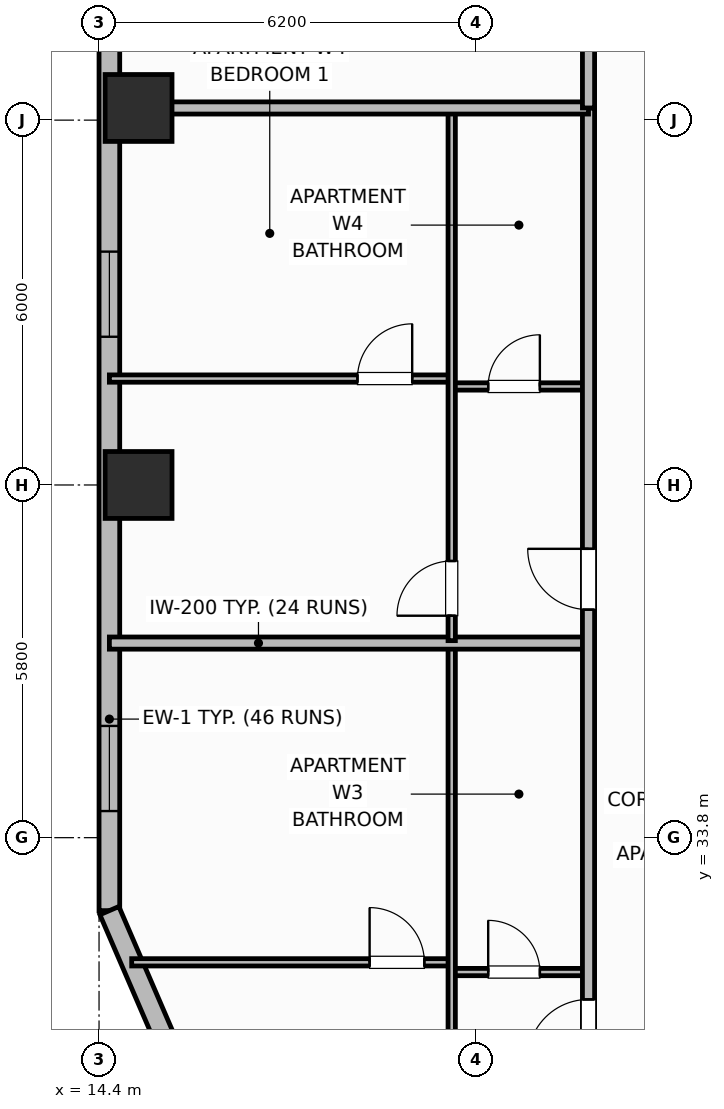
"""IFC4 building model, lengths in metres.
Left out: names, types, materials, properties, quantities, classifications, styles, units other than length and angle.
Written with IfcOpenShell. Run it as: python <this file> out.ifc"""

import sys

from ifc_helpers import new_model, si_unit, direction, frame, frame_2d, origin, origin_2d, place, context, subcontext, project, spatial, rectangle, extrude, element, fill, save


model = new_model("IFC4")
c1 = context("Model", 3, precision=1e-05, world=origin(), true_north=direction((0.0, 1.0)))
c2 = subcontext(c1, "Body", "Model", "MODEL_VIEW")
j1 = project(units=[si_unit("LENGTHUNIT", "METRE"), si_unit("PLANEANGLEUNIT", "RADIAN")], contexts=[c1])
p1 = place(None, origin())
s1 = spatial("IfcSite", under=j1, at=p1, CompositionType="ELEMENT")
p2 = place(p1, origin())
s2 = spatial("IfcBuilding", under=s1, at=p2, CompositionType="ELEMENT")
p3 = place(p2, frame((0.0, 0.0, 95.7)))
s3 = spatial("IfcBuildingStorey", under=s2, at=p3, CompositionType="ELEMENT", Elevation=95.7)
for number, where, z_axis, x_axis in (
    (1, (15.05, 39.6, 0.0), (0.0, 0.0, 1.0), (1.0, 0.0, 0.0)),
    (2, (15.05, 45.8, 0.0), (0.0, 0.0, 1.0), (1.0, 0.0, 0.0)),
):
    element("IfcColumn", number, at=place(p3, frame(where, z_axis=z_axis, x_axis=x_axis)), inside=s3, PredefinedType="COLUMN", context=c2, shape_type="SweptSolid", body=[
        extrude(rectangle(XDim=1.1, YDim=1.1, at=origin_2d()), origin(), (0.0, 0.0, 1.0), 3.7),
    ])
p4 = place(p3, frame((14.57, 47.4, 0.0), z_axis=(0.0, 0.0, 1.0), x_axis=(0.0, -1.0, 0.0)))
e3 = element("IfcWall", 3, at=p4, inside=s3, PredefinedType="SOLIDWALL", context=c2, shape_type="SweptSolid", body=[
    extrude(rectangle(XDim=14.8, YDim=0.34, at=frame_2d((7.4, 0.0))), origin(), (0.0, 0.0, 1.0), 2.7),
])
p5 = place(p4, frame((3.962, 0.0, 0.73)))
e4 = element("IfcOpeningElement", 4, at=p5, cuts=e3, PredefinedType="OPENING", context=c2, shape_type="SweptSolid", body=[
    extrude(rectangle(XDim=1.4, YDim=1.85, at=frame_2d((0.7, 0.925))), frame((0.0, 0.18, 0.0), z_axis=(0.0, -1.0, 0.0), x_axis=(1.0, 0.0, 0.0)), (0.0, 0.0, 1.0), 0.36),
])
p6 = place(p4, frame((11.762, 0.0, 0.73)))
e5 = element("IfcOpeningElement", 5, at=p6, cuts=e3, PredefinedType="OPENING", context=c2, shape_type="SweptSolid", body=[
    extrude(rectangle(XDim=1.4, YDim=1.85, at=frame_2d((0.7, 0.925))), frame((0.0, 0.18, 0.0), z_axis=(0.0, -1.0, 0.0), x_axis=(1.0, 0.0, 0.0)), (0.0, 0.0, 1.0), 0.36),
])
p7 = place(p3, frame((14.57, 32.6, 0.0), z_axis=(0.0, 0.0, 1.0), x_axis=(0.396389181543, -0.918082576218, 0.0)))
e6 = element("IfcWall", 6, at=p7, inside=s3, PredefinedType="SOLIDWALL", context=c2, shape_type="SweptSolid", body=[
    extrude(rectangle(XDim=2.396, YDim=0.34, at=frame_2d((1.198, 0.0))), origin(), (0.0, 0.0, 1.0), 2.7),
])
p8 = place(p3, frame((20.2, 31.59, 0.0), z_axis=(0.0, 0.0, 1.0), x_axis=(1.0, 0.0, 0.0)))
e7 = element("IfcWall", 7, at=p8, inside=s3, PredefinedType="PARTITIONING", context=c2, shape_type="SweptSolid", body=[
    extrude(rectangle(XDim=2.25, YDim=0.12, at=frame_2d((1.125, 0.0))), origin(), (0.0, 0.0, 1.0), 2.53),
])
p9 = place(p8, frame((0.6, 0.0, 0.0)))
e8 = element("IfcOpeningElement", 8, at=p9, cuts=e7, PredefinedType="OPENING", context=c2, shape_type="SweptSolid", body=[
    extrude(rectangle(XDim=0.85, YDim=2.1, at=frame_2d((0.425, 1.05))), frame((0.0, 0.07, 0.0), z_axis=(0.0, -1.0, 0.0), x_axis=(1.0, 0.0, 0.0)), (0.0, 0.0, 1.0), 0.14),
])
p10 = place(p3, frame((14.937, 31.75, 0.0), z_axis=(0.0, 0.0, 1.0), x_axis=(1.0, 0.0, 0.0)))
e9 = element("IfcWall", 9, at=p10, inside=s3, PredefinedType="PARTITIONING", context=c2, shape_type="SweptSolid", body=[
    extrude(rectangle(XDim=5.263, YDim=0.12, at=frame_2d((2.631, 0.0))), origin(), (0.0, 0.0, 1.0), 2.53),
])
p11 = place(p10, frame((3.913, 0.0, 0.0)))
e10 = element("IfcOpeningElement", 10, at=p11, cuts=e9, PredefinedType="OPENING", context=c2, shape_type="SweptSolid", body=[
    extrude(rectangle(XDim=0.9, YDim=2.1, at=frame_2d((0.45, 1.05))), frame((0.0, 0.07, 0.0), z_axis=(0.0, -1.0, 0.0), x_axis=(1.0, 0.0, 0.0)), (0.0, 0.0, 1.0), 0.14),
])
p12 = place(p3, frame((20.2, 26.64, 0.0), z_axis=(0.0, 0.0, 1.0), x_axis=(0.0, 1.0, 0.0)))
e11 = element("IfcWall", 11, at=p12, inside=s3, PredefinedType="PARTITIONING", context=c2, shape_type="SweptSolid", body=[
    extrude(rectangle(XDim=10.32, YDim=0.12, at=frame_2d((5.16, 0.0))), origin(), (0.0, 0.0, 1.0), 2.53),
])
p13 = place(p12, frame((2.81, 0.0, 0.0)))
e12 = element("IfcOpeningElement", 12, at=p13, cuts=e11, PredefinedType="OPENING", context=c2, shape_type="SweptSolid", body=[
    extrude(rectangle(XDim=0.9, YDim=2.1, at=frame_2d((0.45, 1.05))), frame((0.0, 0.07, 0.0), z_axis=(0.0, -1.0, 0.0), x_axis=(1.0, 0.0, 0.0)), (0.0, 0.0, 1.0), 0.14),
])
p14 = place(p3, frame((14.57, 37.0, 0.0), z_axis=(0.0, 0.0, 1.0), x_axis=(1.0, 0.0, 0.0)))
e13 = element("IfcWall", 13, at=p14, inside=s3, PredefinedType="PARTITIONING", context=c2, shape_type="SweptSolid", body=[
    extrude(rectangle(XDim=7.88, YDim=0.2, at=frame_2d((3.94, 0.0))), origin(), (0.0, 0.0, 1.0), 2.53),
])
p15 = place(p3, frame((20.2, 41.22, 0.0), z_axis=(0.0, 0.0, 1.0), x_axis=(1.0, 0.0, 0.0)))
e14 = element("IfcWall", 14, at=p15, inside=s3, PredefinedType="PARTITIONING", context=c2, shape_type="SweptSolid", body=[
    extrude(rectangle(XDim=2.25, YDim=0.12, at=frame_2d((1.125, 0.0))), origin(), (0.0, 0.0, 1.0), 2.53),
])
p16 = place(p15, frame((0.6, 0.0, 0.0)))
e15 = element("IfcOpeningElement", 15, at=p16, cuts=e14, PredefinedType="OPENING", context=c2, shape_type="SweptSolid", body=[
    extrude(rectangle(XDim=0.85, YDim=2.1, at=frame_2d((0.425, 1.05))), frame((0.0, 0.07, 0.0), z_axis=(0.0, -1.0, 0.0), x_axis=(1.0, 0.0, 0.0)), (0.0, 0.0, 1.0), 0.14),
])
p17 = place(p3, frame((14.57, 41.35, 0.0), z_axis=(0.0, 0.0, 1.0), x_axis=(1.0, 0.0, 0.0)))
e16 = element("IfcWall", 16, at=p17, inside=s3, PredefinedType="PARTITIONING", context=c2, shape_type="SweptSolid", body=[
    extrude(rectangle(XDim=5.63, YDim=0.12, at=frame_2d((2.815, 0.0))), origin(), (0.0, 0.0, 1.0), 2.53),
])
p18 = place(p17, frame((4.08, 0.0, 0.0)))
e17 = element("IfcOpeningElement", 17, at=p18, cuts=e16, PredefinedType="OPENING", context=c2, shape_type="SweptSolid", body=[
    extrude(rectangle(XDim=0.9, YDim=2.1, at=frame_2d((0.45, 1.05))), frame((0.0, 0.07, 0.0), z_axis=(0.0, -1.0, 0.0), x_axis=(1.0, 0.0, 0.0)), (0.0, 0.0, 1.0), 0.14),
])
p19 = place(p3, frame((20.2, 37.04, 0.0), z_axis=(0.0, 0.0, 1.0), x_axis=(0.0, 1.0, 0.0)))
e18 = element("IfcWall", 18, at=p19, inside=s3, PredefinedType="PARTITIONING", context=c2, shape_type="SweptSolid", body=[
    extrude(rectangle(XDim=8.72, YDim=0.12, at=frame_2d((4.36, 0.0))), origin(), (0.0, 0.0, 1.0), 2.53),
])
p20 = place(p19, frame((0.41, 0.0, 0.0)))
e19 = element("IfcOpeningElement", 19, at=p20, cuts=e18, PredefinedType="OPENING", context=c2, shape_type="SweptSolid", body=[
    extrude(rectangle(XDim=0.9, YDim=2.1, at=frame_2d((0.45, 1.05))), frame((0.0, 0.07, 0.0), z_axis=(0.0, -1.0, 0.0), x_axis=(1.0, 0.0, 0.0)), (0.0, 0.0, 1.0), 0.14),
])
p21 = place(p3, frame((22.45, 10.6, 0.0), z_axis=(0.0, 0.0, 1.0), x_axis=(0.0, 1.0, 0.0)))
e20 = element("IfcWall", 20, at=p21, inside=s3, PredefinedType="PARTITIONING", context=c2, shape_type="SweptSolid", body=[
    extrude(rectangle(XDim=35.2, YDim=0.2, at=frame_2d((17.6, 0.0))), origin(), (0.0, 0.0, 1.0), 2.53),
])
p22 = place(p21, frame((2.65, 0.0, 0.0)))
e21 = element("IfcOpeningElement", 21, at=p22, cuts=e20, PredefinedType="OPENING", context=c2, shape_type="SweptSolid", body=[
    extrude(rectangle(XDim=1.0, YDim=2.15, at=frame_2d((0.5, 1.075))), frame((0.0, 0.11, 0.0), z_axis=(0.0, -1.0, 0.0), x_axis=(1.0, 0.0, 0.0)), (0.0, 0.0, 1.0), 0.22),
])
p23 = place(p21, frame((10.81, 0.0, 0.0)))
e22 = element("IfcOpeningElement", 22, at=p23, cuts=e20, PredefinedType="OPENING", context=c2, shape_type="SweptSolid", body=[
    extrude(rectangle(XDim=1.0, YDim=2.15, at=frame_2d((0.5, 1.075))), frame((0.0, 0.11, 0.0), z_axis=(0.0, -1.0, 0.0), x_axis=(1.0, 0.0, 0.0)), (0.0, 0.0, 1.0), 0.22),
])
p24 = place(p21, frame((19.54, 0.0, 0.0)))
e23 = element("IfcOpeningElement", 23, at=p24, cuts=e20, PredefinedType="OPENING", context=c2, shape_type="SweptSolid", body=[
    extrude(rectangle(XDim=1.0, YDim=2.15, at=frame_2d((0.5, 1.075))), frame((0.0, 0.11, 0.0), z_axis=(0.0, -1.0, 0.0), x_axis=(1.0, 0.0, 0.0)), (0.0, 0.0, 1.0), 0.22),
])
p25 = place(p21, frame((26.95, 0.0, 0.0)))
e24 = element("IfcOpeningElement", 24, at=p25, cuts=e20, PredefinedType="OPENING", context=c2, shape_type="SweptSolid", body=[
    extrude(rectangle(XDim=1.0, YDim=2.15, at=frame_2d((0.5, 1.075))), frame((0.0, 0.11, 0.0), z_axis=(0.0, -1.0, 0.0), x_axis=(1.0, 0.0, 0.0)), (0.0, 0.0, 1.0), 0.22),
])
p26 = place(p3, frame((14.99, 45.8, 0.0), z_axis=(0.0, 0.0, 1.0), x_axis=(1.0, 0.0, 0.0)))
e25 = element("IfcWall", 25, at=p26, inside=s3, PredefinedType="PARTITIONING", context=c2, shape_type="SweptSolid", body=[
    extrude(rectangle(XDim=7.46, YDim=0.2, at=frame_2d((3.73, 0.0))), origin(), (0.0, 0.0, 1.0), 2.53),
])
p27 = place(p3, frame((22.45, 45.8, 0.0), z_axis=(0.0, 0.0, 1.0), x_axis=(0.0, 1.0, 0.0)))
e26 = element("IfcWall", 26, at=p27, inside=s3, PredefinedType="PARTITIONING", context=c2, shape_type="SweptSolid", body=[
    extrude(rectangle(XDim=5.63, YDim=0.2, at=frame_2d((2.815, 0.0))), origin(), (0.0, 0.0, 1.0), 2.53),
])
p28 = place(p5, origin())
e27 = element("IfcWindow", 27, at=p28, inside=s3, PartitioningType="SINGLE_PANEL", PredefinedType="WINDOW", context=c2, shape_type="SweptSolid", body=[
    extrude(rectangle(XDim=1.4, YDim=1.85, at=frame_2d((0.7, 0.925))), frame((0.0, 0.03, 0.0), z_axis=(0.0, -1.0, 0.0), x_axis=(1.0, 0.0, 0.0)), (0.0, 0.0, 1.0), 0.06),
])
fill(e4, e27)
p29 = place(p6, origin())
e28 = element("IfcWindow", 28, at=p29, inside=s3, PartitioningType="SINGLE_PANEL", PredefinedType="WINDOW", context=c2, shape_type="SweptSolid", body=[
    extrude(rectangle(XDim=1.4, YDim=1.85, at=frame_2d((0.7, 0.925))), frame((0.0, 0.03, 0.0), z_axis=(0.0, -1.0, 0.0), x_axis=(1.0, 0.0, 0.0)), (0.0, 0.0, 1.0), 0.06),
])
fill(e5, e28)
p30 = place(p9, origin())
e29 = element("IfcDoor", 29, at=p30, inside=s3, OperationType="SINGLE_SWING_LEFT", PredefinedType="DOOR", context=c2, shape_type="SweptSolid", body=[
    extrude(rectangle(XDim=0.85, YDim=2.1, at=frame_2d((0.425, 1.05))), frame((0.0, 0.025, 0.0), z_axis=(0.0, -1.0, 0.0), x_axis=(1.0, 0.0, 0.0)), (0.0, 0.0, 1.0), 0.05),
])
fill(e8, e29)
p31 = place(p11, origin())
e30 = element("IfcDoor", 30, at=p31, inside=s3, OperationType="SINGLE_SWING_LEFT", PredefinedType="DOOR", context=c2, shape_type="SweptSolid", body=[
    extrude(rectangle(XDim=0.9, YDim=2.1, at=frame_2d((0.45, 1.05))), frame((0.0, 0.025, 0.0), z_axis=(0.0, -1.0, 0.0), x_axis=(1.0, 0.0, 0.0)), (0.0, 0.0, 1.0), 0.05),
])
fill(e10, e30)
p32 = place(p16, origin())
e31 = element("IfcDoor", 31, at=p32, inside=s3, OperationType="SINGLE_SWING_RIGHT", PredefinedType="DOOR", context=c2, shape_type="SweptSolid", body=[
    extrude(rectangle(XDim=0.85, YDim=2.1, at=frame_2d((0.425, 1.05))), frame((0.0, 0.025, 0.0), z_axis=(0.0, -1.0, 0.0), x_axis=(1.0, 0.0, 0.0)), (0.0, 0.0, 1.0), 0.05),
])
fill(e15, e31)
p33 = place(p18, origin())
e32 = element("IfcDoor", 32, at=p33, inside=s3, OperationType="SINGLE_SWING_RIGHT", PredefinedType="DOOR", context=c2, shape_type="SweptSolid", body=[
    extrude(rectangle(XDim=0.9, YDim=2.1, at=frame_2d((0.45, 1.05))), frame((0.0, 0.025, 0.0), z_axis=(0.0, -1.0, 0.0), x_axis=(1.0, 0.0, 0.0)), (0.0, 0.0, 1.0), 0.05),
])
fill(e17, e32)
p34 = place(p20, origin())
e33 = element("IfcDoor", 33, at=p34, inside=s3, OperationType="SINGLE_SWING_LEFT", PredefinedType="DOOR", context=c2, shape_type="SweptSolid", body=[
    extrude(rectangle(XDim=0.9, YDim=2.1, at=frame_2d((0.45, 1.05))), frame((0.0, 0.025, 0.0), z_axis=(0.0, -1.0, 0.0), x_axis=(1.0, 0.0, 0.0)), (0.0, 0.0, 1.0), 0.05),
])
fill(e19, e33)
p35 = place(p24, origin())
e34 = element("IfcDoor", 34, at=p35, inside=s3, OperationType="SINGLE_SWING_LEFT", PredefinedType="DOOR", context=c2, shape_type="SweptSolid", body=[
    extrude(rectangle(XDim=1.0, YDim=2.15, at=frame_2d((0.5, 1.075))), frame((0.0, 0.025, 0.0), z_axis=(0.0, -1.0, 0.0), x_axis=(1.0, 0.0, 0.0)), (0.0, 0.0, 1.0), 0.05),
])
fill(e23, e34)
p36 = place(p25, origin())
e35 = element("IfcDoor", 35, at=p36, inside=s3, OperationType="SINGLE_SWING_RIGHT", PredefinedType="DOOR", context=c2, shape_type="SweptSolid", body=[
    extrude(rectangle(XDim=1.0, YDim=2.15, at=frame_2d((0.5, 1.075))), frame((0.0, 0.025, 0.0), z_axis=(0.0, -1.0, 0.0), x_axis=(1.0, 0.0, 0.0)), (0.0, 0.0, 1.0), 0.05),
])
fill(e24, e35)
save(model, sys.argv[1])
